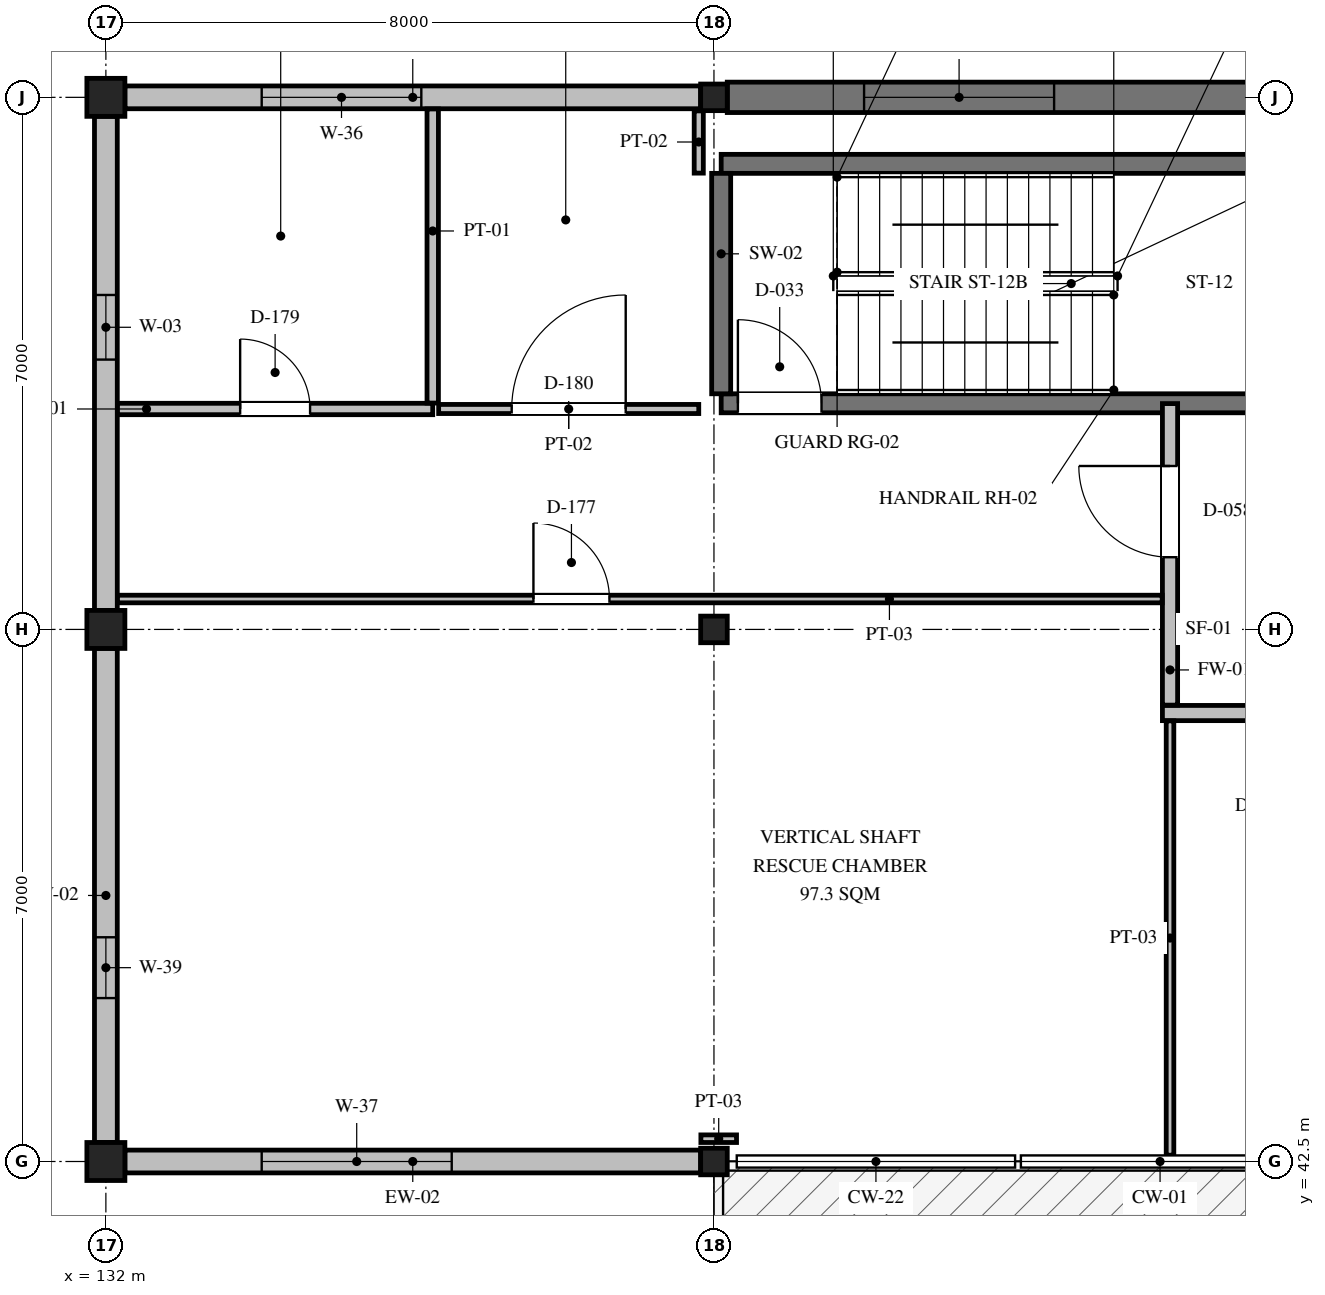
"""IFC4 building model, lengths in metres.
Left out: names, types, materials, properties, quantities, classifications, styles, units other than length and angle.
Written with IfcOpenShell. Run it as: python <this file> out.ifc"""

import sys

from ifc_helpers import new_model, si_unit, direction, frame, frame_2d, origin, origin_2d, place, context, subcontext, project, spatial, rectangle, i_section, extrude, element, fill, save


model = new_model("IFC4")
c1 = context("Model", 3, precision=1e-05, world=origin(), true_north=direction((0.0, 1.0)))
c2 = subcontext(c1, "Body", "Model", "MODEL_VIEW")
j1 = project(units=[si_unit("LENGTHUNIT", "METRE"), si_unit("PLANEANGLEUNIT", "RADIAN")], contexts=[c1])
p1 = place(None, origin())
s1 = spatial("IfcSite", under=j1, at=p1, CompositionType="ELEMENT")
p2 = place(p1, origin())
s2 = spatial("IfcBuilding", under=s1, at=p2, CompositionType="ELEMENT")
p3 = place(p2, frame((0.0, 0.0, 14.25)))
s3 = spatial("IfcBuildingStorey", under=s2, at=p3, CompositionType="ELEMENT", Elevation=14.25)
for number, where, z_axis, x_axis in (
    (1, (132.0, 42.5, 0.0), (0.0, 0.0, 1.0), (1.0, 0.0, 0.0)),
    (2, (132.0, 49.5, 0.0), (0.0, 0.0, 1.0), (1.0, 0.0, 0.0)),
    (3, (132.0, 56.5, 0.0), (0.0, 0.0, 1.0), (1.0, 0.0, 0.0)),
):
    element("IfcColumn", number, at=place(p3, frame(where, z_axis=z_axis, x_axis=x_axis)), inside=s3, PredefinedType="COLUMN", context=c2, shape_type="SweptSolid", body=[
        extrude(rectangle(XDim=0.5, YDim=0.5, at=origin_2d()), origin(), (0.0, 0.0, 1.0), 4.2),
    ])
for number, where, z_axis, x_axis in (
    (4, (140.0, 42.5, 0.0), (0.0, 0.0, 1.0), (1.0, 0.0, 0.0)),
    (5, (140.0, 49.5, 0.0), (0.0, 0.0, 1.0), (1.0, 0.0, 0.0)),
    (6, (140.0, 56.5, 0.0), (0.0, 0.0, 1.0), (1.0, 0.0, 0.0)),
):
    element("IfcColumn", number, at=place(p3, frame(where, z_axis=z_axis, x_axis=x_axis)), inside=s3, PredefinedType="COLUMN", context=c2, shape_type="SweptSolid", body=[
        extrude(i_section(OverallWidth=0.35, OverallDepth=0.35, WebThickness=0.012, FlangeThickness=0.019, FilletRadius=0.02, at=origin_2d()), origin(), (0.0, 0.0, 1.0), 4.2),
    ])
p4 = place(p3, frame((132.25, 56.5, 0.0), z_axis=(0.0, 0.0, 1.0), x_axis=(1.0, 0.0, 0.0)))
e7 = element("IfcWall", 7, at=p4, inside=s3, PredefinedType="SOLIDWALL", context=c2, shape_type="SweptSolid", body=[
    extrude(rectangle(XDim=7.575, YDim=0.3, at=frame_2d((3.788, 0.0))), origin(), (0.0, 0.0, 1.0), 3.444),
])
p5 = place(p4, frame((1.8, 0.0, 0.9)))
e8 = element("IfcOpeningElement", 8, at=p5, cuts=e7, PredefinedType="OPENING", context=c2, shape_type="SweptSolid", body=[
    extrude(rectangle(XDim=2.1, YDim=2.1, at=frame_2d((1.05, 1.05))), frame((0.0, 0.16, 0.0), z_axis=(0.0, -1.0, 0.0), x_axis=(1.0, 0.0, 0.0)), (0.0, 0.0, 1.0), 0.32),
])
p6 = place(p3, frame((140.175, 56.5, 0.0), z_axis=(0.0, 0.0, 1.0), x_axis=(1.0, 0.0, 0.0)))
e9 = element("IfcWall", 9, at=p6, inside=s3, PredefinedType="SHEAR", context=c2, shape_type="SweptSolid", body=[
    extrude(rectangle(XDim=7.65, YDim=0.4, at=frame_2d((3.825, 0.0))), origin(), (0.0, 0.0, 1.0), 4.0),
])
p7 = place(p6, frame((1.8, 0.0, 0.9)))
e10 = element("IfcOpeningElement", 10, at=p7, cuts=e9, PredefinedType="OPENING", context=c2, shape_type="SweptSolid", body=[
    extrude(rectangle(XDim=2.5, YDim=2.1, at=frame_2d((1.25, 1.05))), frame((0.0, 0.21, 0.0), z_axis=(0.0, -1.0, 0.0), x_axis=(1.0, 0.0, 0.0)), (0.0, 0.0, 1.0), 0.42),
])
p8 = place(p3, frame((132.0, 42.75, 0.0), z_axis=(0.0, 0.0, 1.0), x_axis=(0.0, 1.0, 0.0)))
e11 = element("IfcWall", 11, at=p8, inside=s3, PredefinedType="SOLIDWALL", context=c2, shape_type="SweptSolid", body=[
    extrude(rectangle(XDim=6.5, YDim=0.3, at=frame_2d((3.25, 0.0))), origin(), (0.0, 0.0, 1.0), 3.494),
])
p9 = place(p8, frame((1.9, 0.0, 0.85)))
e12 = element("IfcOpeningElement", 12, at=p9, cuts=e11, PredefinedType="OPENING", context=c2, shape_type="SweptSolid", body=[
    extrude(rectangle(XDim=0.8, YDim=1.3, at=frame_2d((0.4, 0.65))), frame((0.0, 0.16, 0.0), z_axis=(0.0, -1.0, 0.0), x_axis=(1.0, 0.0, 0.0)), (0.0, 0.0, 1.0), 0.32),
])
p10 = place(p3, frame((132.0, 49.75, 0.0), z_axis=(0.0, 0.0, 1.0), x_axis=(0.0, 1.0, 0.0)))
e13 = element("IfcWall", 13, at=p10, inside=s3, PredefinedType="SOLIDWALL", context=c2, shape_type="SweptSolid", body=[
    extrude(rectangle(XDim=6.5, YDim=0.3, at=frame_2d((3.25, 0.0))), origin(), (0.0, 0.0, 1.0), 3.554),
])
p11 = place(p10, frame((3.3, 0.0, 1.05)))
e14 = element("IfcOpeningElement", 14, at=p11, cuts=e13, PredefinedType="OPENING", context=c2, shape_type="SweptSolid", body=[
    extrude(rectangle(XDim=0.85, YDim=0.85, at=frame_2d((0.425, 0.425))), frame((0.0, 0.16, 0.0), z_axis=(0.0, -1.0, 0.0), x_axis=(1.0, 0.0, 0.0)), (0.0, 0.0, 1.0), 0.32),
])
p12 = place(p3, frame((132.25, 42.5, 0.0), z_axis=(0.0, 0.0, 1.0), x_axis=(1.0, 0.0, 0.0)))
e15 = element("IfcWall", 15, at=p12, inside=s3, PredefinedType="SOLIDWALL", context=c2, shape_type="SweptSolid", body=[
    extrude(rectangle(XDim=7.575, YDim=0.3, at=frame_2d((3.788, 0.0))), origin(), (0.0, 0.0, 1.0), 3.494),
])
p13 = place(p12, frame((1.8, 0.0, 0.9)))
e16 = element("IfcOpeningElement", 16, at=p13, cuts=e15, PredefinedType="OPENING", context=c2, shape_type="SweptSolid", body=[
    extrude(rectangle(XDim=2.5, YDim=2.1, at=frame_2d((1.25, 1.05))), frame((0.0, 0.16, 0.0), z_axis=(0.0, -1.0, 0.0), x_axis=(1.0, 0.0, 0.0)), (0.0, 0.0, 1.0), 0.32),
])
p14 = place(p3, frame((140.095, 52.475, 0.0), z_axis=(0.0, 0.0, 1.0), x_axis=(1.0, 0.0, 0.0)))
e17 = element("IfcWall", 17, at=p14, inside=s3, PredefinedType="SHEAR", context=c2, shape_type="SweptSolid", body=[
    extrude(rectangle(XDim=7.81, YDim=0.25, at=frame_2d((3.905, 0.0))), origin(), (0.0, 0.0, 1.0), 4.0),
])
p15 = place(p14, frame((0.22, 0.0, 0.0)))
e18 = element("IfcOpeningElement", 18, at=p15, cuts=e17, PredefinedType="OPENING", context=c2, shape_type="SweptSolid", body=[
    extrude(rectangle(XDim=1.1, YDim=2.15, at=frame_2d((0.55, 1.075))), frame((0.0, 0.135, 0.0), z_axis=(0.0, -1.0, 0.0), x_axis=(1.0, 0.0, 0.0)), (0.0, 0.0, 1.0), 0.27),
])
p16 = place(p3, frame((140.095, 55.625, 0.0), z_axis=(0.0, 0.0, 1.0), x_axis=(1.0, 0.0, 0.0)))
e19 = element("IfcWall", 19, at=p16, inside=s3, PredefinedType="SHEAR", context=c2, shape_type="SweptSolid", body=[
    extrude(rectangle(XDim=7.81, YDim=0.25, at=frame_2d((3.905, 0.0))), origin(), (0.0, 0.0, 1.0), 4.0),
])
p17 = place(p3, frame((140.095, 52.6, 0.0), z_axis=(0.0, 0.0, 1.0), x_axis=(0.0, 1.0, 0.0)))
e20 = element("IfcWall", 20, at=p17, inside=s3, PredefinedType="SHEAR", context=c2, shape_type="SweptSolid", body=[
    extrude(rectangle(XDim=2.9, YDim=0.25, at=frame_2d((1.45, 0.0))), origin(), (0.0, 0.0, 1.0), 4.0),
])
p18 = place(p3, frame((145.9, 48.4, 0.0), z_axis=(0.0, 0.0, 1.0), x_axis=(1.0, 0.0, 0.0)))
e21 = element("IfcWall", 21, at=p18, inside=s3, PredefinedType="PARTITIONING", context=c2, shape_type="SweptSolid", body=[
    extrude(rectangle(XDim=8.7, YDim=0.2, at=frame_2d((4.35, 0.0))), origin(), (0.0, 0.0, 1.0), 4.0),
])
p19 = place(p18, frame((4.3, 0.0, 0.0)))
e22 = element("IfcOpeningElement", 22, at=p19, cuts=e21, PredefinedType="OPENING", context=c2, shape_type="SweptSolid", body=[
    extrude(rectangle(XDim=1.2, YDim=2.15, at=frame_2d((0.6, 1.075))), frame((0.0, 0.11, 0.0), z_axis=(0.0, -1.0, 0.0), x_axis=(1.0, 0.0, 0.0)), (0.0, 0.0, 1.0), 0.22),
])
p20 = place(p3, frame((146.0, 48.504, 0.0), z_axis=(0.0, 0.0, 1.0), x_axis=(0.0, 1.0, 0.0)))
e23 = element("IfcWall", 23, at=p20, inside=s3, PredefinedType="PARTITIONING", context=c2, shape_type="SweptSolid", body=[
    extrude(rectangle(XDim=3.967, YDim=0.2, at=frame_2d((1.983, 0.0))), origin(), (0.0, 0.0, 1.0), 4.0),
])
p21 = place(p20, frame((1.946, 0.0, 0.0)))
e24 = element("IfcOpeningElement", 24, at=p21, cuts=e23, PredefinedType="OPENING", context=c2, shape_type="SweptSolid", body=[
    extrude(rectangle(XDim=1.2, YDim=2.15, at=frame_2d((0.6, 1.075))), frame((0.0, 0.11, 0.0), z_axis=(0.0, -1.0, 0.0), x_axis=(1.0, 0.0, 0.0)), (0.0, 0.0, 1.0), 0.22),
])
p22 = place(p3, frame((139.828, 42.8, 0.0), z_axis=(0.0, 0.0, 1.0), x_axis=(1.0, 0.0, 0.0)))
e25 = element("IfcWall", 25, at=p22, inside=s3, PredefinedType="PARTITIONING", context=c2, shape_type="SweptSolid", body=[
    extrude(rectangle(XDim=0.469, YDim=0.1, at=frame_2d((0.235, 0.0))), origin(), (0.0, 0.0, 1.0), 4.0),
])
p23 = place(p3, frame((132.153, 49.9, 0.0), z_axis=(0.0, 0.0, 1.0), x_axis=(1.0, 0.0, 0.0)))
e26 = element("IfcWall", 26, at=p23, inside=s3, PredefinedType="PARTITIONING", context=c2, shape_type="SweptSolid", body=[
    extrude(rectangle(XDim=13.744, YDim=0.1, at=frame_2d((6.872, 0.0))), origin(), (0.0, 0.0, 1.0), 4.0),
])
p24 = place(p23, frame((5.472, 0.0, 0.0)))
e27 = element("IfcOpeningElement", 27, at=p24, cuts=e26, PredefinedType="OPENING", context=c2, shape_type="SweptSolid", body=[
    extrude(rectangle(XDim=1.0, YDim=2.1, at=frame_2d((0.5, 1.05))), frame((0.0, 0.06, 0.0), z_axis=(0.0, -1.0, 0.0), x_axis=(1.0, 0.0, 0.0)), (0.0, 0.0, 1.0), 0.12),
])
p25 = place(p3, frame((146.0, 42.583, 0.0), z_axis=(0.0, 0.0, 1.0), x_axis=(0.0, 1.0, 0.0)))
e28 = element("IfcWall", 28, at=p25, inside=s3, PredefinedType="PARTITIONING", context=c2, shape_type="SweptSolid", body=[
    extrude(rectangle(XDim=5.714, YDim=0.1, at=frame_2d((2.857, 0.0))), origin(), (0.0, 0.0, 1.0), 4.0),
])
p26 = place(p3, frame((132.153, 52.4, 0.0), z_axis=(0.0, 0.0, 1.0), x_axis=(1.0, 0.0, 0.0)))
e29 = element("IfcWall", 29, at=p26, inside=s3, PredefinedType="PARTITIONING", context=c2, shape_type="SweptSolid", body=[
    extrude(rectangle(XDim=4.147, YDim=0.15, at=frame_2d((2.073, 0.0))), origin(), (0.0, 0.0, 1.0), 4.0),
])
p27 = place(p26, frame((1.614, 0.0, 0.0)))
e30 = element("IfcOpeningElement", 30, at=p27, cuts=e29, PredefinedType="OPENING", context=c2, shape_type="SweptSolid", body=[
    extrude(rectangle(XDim=0.92, YDim=2.1, at=frame_2d((0.46, 1.05))), frame((0.0, 0.085, 0.0), z_axis=(0.0, -1.0, 0.0), x_axis=(1.0, 0.0, 0.0)), (0.0, 0.0, 1.0), 0.17),
])
p28 = place(p3, frame((136.3, 52.478, 0.0), z_axis=(0.0, 0.0, 1.0), x_axis=(0.0, 1.0, 0.0)))
e31 = element("IfcWall", 31, at=p28, inside=s3, PredefinedType="PARTITIONING", context=c2, shape_type="SweptSolid", body=[
    extrude(rectangle(XDim=3.869, YDim=0.15, at=frame_2d((1.935, 0.0))), origin(), (0.0, 0.0, 1.0), 4.0),
])
p29 = place(p3, frame((136.378, 52.4, 0.0), z_axis=(0.0, 0.0, 1.0), x_axis=(1.0, 0.0, 0.0)))
e32 = element("IfcWall", 32, at=p29, inside=s3, PredefinedType="PARTITIONING", context=c2, shape_type="SweptSolid", body=[
    extrude(rectangle(XDim=3.422, YDim=0.12, at=frame_2d((1.711, 0.0))), origin(), (0.0, 0.0, 1.0), 4.0),
])
p30 = place(p29, frame((0.961, 0.0, 0.0)))
e33 = element("IfcOpeningElement", 33, at=p30, cuts=e32, PredefinedType="OPENING", context=c2, shape_type="SweptSolid", body=[
    extrude(rectangle(XDim=1.5, YDim=2.25, at=frame_2d((0.75, 1.125))), frame((0.0, 0.07, 0.0), z_axis=(0.0, -1.0, 0.0), x_axis=(1.0, 0.0, 0.0)), (0.0, 0.0, 1.0), 0.14),
])
p31 = place(p3, frame((139.8, 55.503, 0.0), z_axis=(0.0, 0.0, 1.0), x_axis=(0.0, 1.0, 0.0)))
e34 = element("IfcWall", 34, at=p31, inside=s3, PredefinedType="PARTITIONING", context=c2, shape_type="SweptSolid", body=[
    extrude(rectangle(XDim=0.819, YDim=0.12, at=frame_2d((0.41, 0.0))), origin(), (0.0, 0.0, 1.0), 4.0),
])
p32 = place(p5, origin())
e35 = element("IfcWindow", 35, at=p32, inside=s3, PartitioningType="SINGLE_PANEL", PredefinedType="WINDOW", context=c2, shape_type="SweptSolid", body=[
    extrude(rectangle(XDim=2.1, YDim=2.1, at=frame_2d((1.05, 1.05))), frame((0.0, 0.03, 0.0), z_axis=(0.0, -1.0, 0.0), x_axis=(1.0, 0.0, 0.0)), (0.0, 0.0, 1.0), 0.06),
])
fill(e8, e35)
p33 = place(p7, origin())
e36 = element("IfcWindow", 36, at=p33, inside=s3, PartitioningType="SINGLE_PANEL", PredefinedType="WINDOW", context=c2, shape_type="SweptSolid", body=[
    extrude(rectangle(XDim=2.5, YDim=2.1, at=frame_2d((1.25, 1.05))), frame((0.0, 0.03, 0.0), z_axis=(0.0, -1.0, 0.0), x_axis=(1.0, 0.0, 0.0)), (0.0, 0.0, 1.0), 0.06),
])
fill(e10, e36)
p34 = place(p9, origin())
e37 = element("IfcWindow", 37, at=p34, inside=s3, PartitioningType="SINGLE_PANEL", PredefinedType="WINDOW", context=c2, shape_type="SweptSolid", body=[
    extrude(rectangle(XDim=0.8, YDim=1.3, at=frame_2d((0.4, 0.65))), frame((0.0, 0.03, 0.0), z_axis=(0.0, -1.0, 0.0), x_axis=(1.0, 0.0, 0.0)), (0.0, 0.0, 1.0), 0.06),
])
fill(e12, e37)
p35 = place(p11, origin())
e38 = element("IfcWindow", 38, at=p35, inside=s3, PartitioningType="SINGLE_PANEL", PredefinedType="WINDOW", context=c2, shape_type="SweptSolid", body=[
    extrude(rectangle(XDim=0.85, YDim=0.85, at=frame_2d((0.425, 0.425))), frame((0.0, 0.03, 0.0), z_axis=(0.0, -1.0, 0.0), x_axis=(1.0, 0.0, 0.0)), (0.0, 0.0, 1.0), 0.06),
])
fill(e14, e38)
p36 = place(p13, origin())
e39 = element("IfcWindow", 39, at=p36, inside=s3, PartitioningType="SINGLE_PANEL", PredefinedType="WINDOW", context=c2, shape_type="SweptSolid", body=[
    extrude(rectangle(XDim=2.5, YDim=2.1, at=frame_2d((1.25, 1.05))), frame((0.0, 0.03, 0.0), z_axis=(0.0, -1.0, 0.0), x_axis=(1.0, 0.0, 0.0)), (0.0, 0.0, 1.0), 0.06),
])
fill(e16, e39)
p37 = place(p15, frame((1.1, 0.0, 0.0), z_axis=(0.0, 0.0, 1.0), x_axis=(-1.0, 0.0, 0.0)))
e40 = element("IfcDoor", 40, at=p37, inside=s3, OperationType="SINGLE_SWING_LEFT", PredefinedType="DOOR", context=c2, shape_type="SweptSolid", body=[
    extrude(rectangle(XDim=1.1, YDim=2.15, at=frame_2d((0.55, 1.075))), frame((0.0, 0.025, 0.0), z_axis=(0.0, -1.0, 0.0), x_axis=(1.0, 0.0, 0.0)), (0.0, 0.0, 1.0), 0.05),
])
fill(e18, e40)
p38 = place(p21, origin())
e41 = element("IfcDoor", 41, at=p38, inside=s3, OperationType="SINGLE_SWING_RIGHT", PredefinedType="DOOR", context=c2, shape_type="SweptSolid", body=[
    extrude(rectangle(XDim=1.2, YDim=2.15, at=frame_2d((0.6, 1.075))), frame((0.0, 0.025, 0.0), z_axis=(0.0, -1.0, 0.0), x_axis=(1.0, 0.0, 0.0)), (0.0, 0.0, 1.0), 0.05),
])
fill(e24, e41)
p39 = place(p24, origin())
e42 = element("IfcDoor", 42, at=p39, inside=s3, OperationType="SINGLE_SWING_LEFT", PredefinedType="DOOR", context=c2, shape_type="SweptSolid", body=[
    extrude(rectangle(XDim=1.0, YDim=2.1, at=frame_2d((0.5, 1.05))), frame((0.0, 0.025, 0.0), z_axis=(0.0, -1.0, 0.0), x_axis=(1.0, 0.0, 0.0)), (0.0, 0.0, 1.0), 0.05),
])
fill(e27, e42)
p40 = place(p27, origin())
e43 = element("IfcDoor", 43, at=p40, inside=s3, OperationType="SINGLE_SWING_LEFT", PredefinedType="DOOR", context=c2, shape_type="SweptSolid", body=[
    extrude(rectangle(XDim=0.92, YDim=2.1, at=frame_2d((0.46, 1.05))), frame((0.0, 0.025, 0.0), z_axis=(0.0, -1.0, 0.0), x_axis=(1.0, 0.0, 0.0)), (0.0, 0.0, 1.0), 0.05),
])
fill(e30, e43)
p41 = place(p30, origin())
e44 = element("IfcDoor", 44, at=p41, inside=s3, OperationType="SINGLE_SWING_RIGHT", PredefinedType="DOOR", context=c2, shape_type="SweptSolid", body=[
    extrude(rectangle(XDim=1.5, YDim=2.25, at=frame_2d((0.75, 1.125))), frame((0.0, 0.025, 0.0), z_axis=(0.0, -1.0, 0.0), x_axis=(1.0, 0.0, 0.0)), (0.0, 0.0, 1.0), 0.05),
])
fill(e33, e44)
save(model, sys.argv[1])
